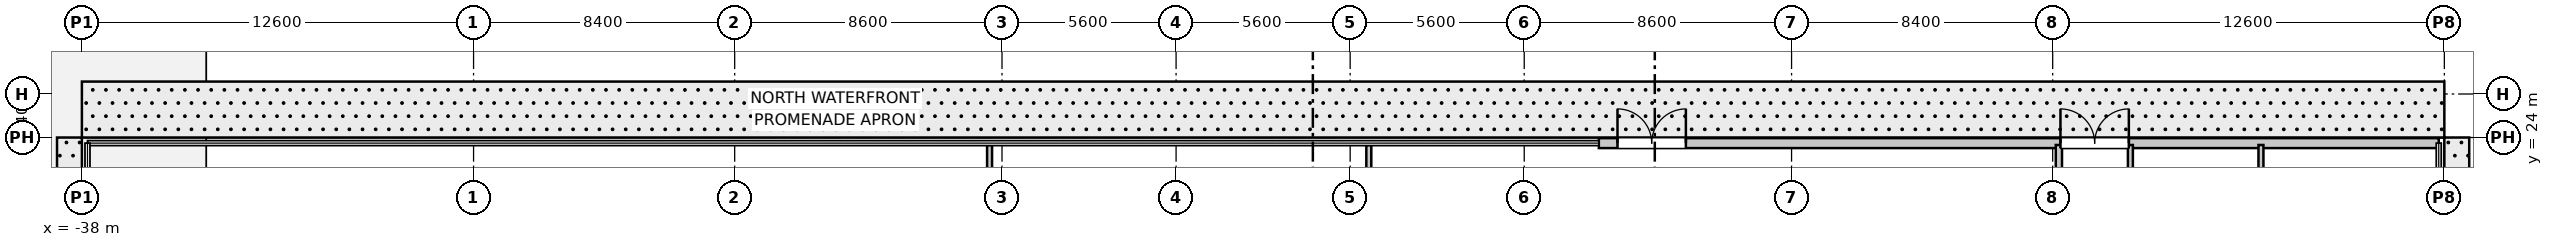
"""IFC4 building model, lengths in metres.
Left out: names, types, materials, properties, quantities, classifications, styles, units other than length and angle.
Written with IfcOpenShell. Run it as: python <this file> out.ifc"""

import sys

from ifc_helpers import new_model, si_unit, direction, frame, frame_2d, origin, place, context, subcontext, project, spatial, rectangle, extrude, source, transform, mapped, element, fill, save


model = new_model("IFC4")
c1 = context("Model", 3, precision=1e-05, world=origin(), true_north=direction((0.0, 1.0)))
c2 = subcontext(c1, "Body", "Model", "MODEL_VIEW")
j1 = project(units=[si_unit("LENGTHUNIT", "METRE"), si_unit("PLANEANGLEUNIT", "RADIAN")], contexts=[c1])
p1 = place(None, origin())
s1 = spatial("IfcSite", under=j1, at=p1, CompositionType="ELEMENT")
p2 = place(p1, origin())
s2 = spatial("IfcBuilding", under=s1, at=p2, CompositionType="ELEMENT")
p3 = place(p2, origin())
s3 = spatial("IfcBuildingStorey", under=s2, at=p3, CompositionType="ELEMENT", Elevation=0.0)
m1 = source(origin(), c2, "Body", "SweptSolid", [
    extrude(rectangle(XDim=27.02, YDim=0.32, at=frame_2d((13.51, 0.0))), origin(), (0.0, 0.0, 1.0), 5.08),
])
p4 = place(p3, frame((10.8, 23.82, 0.0), z_axis=(0.0, 0.0, 1.0), x_axis=(1.0, 0.0, 0.0)))
e1 = element("IfcWall", 1, at=p4, inside=s3, PredefinedType="STANDARD", context=c2, shape_type="MappedRepresentation", body=[
    mapped(m1, transform((0.0, 0.0, 0.0), scale=1.0)),
])
p5 = place(p4, frame((0.6, 0.0, 0.0)))
e2 = element("IfcOpeningElement", 2, at=p5, cuts=e1, PredefinedType="OPENING", context=c2, shape_type="SweptSolid", body=[
    extrude(rectangle(XDim=2.2, YDim=2.6, at=frame_2d((1.1, 1.3))), frame((0.0, 0.17, 0.0), z_axis=(0.0, -1.0, 0.0), x_axis=(1.0, 0.0, 0.0)), (0.0, 0.0, 1.0), 0.34),
])
p6 = place(p4, frame((14.85, 0.0, 0.0)))
e3 = element("IfcOpeningElement", 3, at=p6, cuts=e1, PredefinedType="OPENING", context=c2, shape_type="SweptSolid", body=[
    extrude(rectangle(XDim=2.2, YDim=2.6, at=frame_2d((1.1, 1.3))), frame((0.0, 0.17, 0.0), z_axis=(0.0, -1.0, 0.0), x_axis=(1.0, 0.0, 0.0)), (0.0, 0.0, 1.0), 0.34),
])
m2 = source(origin(), c2, "Body", "SweptSolid", [
    extrude(rectangle(XDim=19.21, YDim=0.2, at=frame_2d((9.605, 0.0))), origin(), (0.0, 0.0, 1.0), 3.4),
])
p7 = place(p3, frame((25.6, 4.55, 0.0), z_axis=(0.0, 0.0, 1.0), x_axis=(0.0, 1.0, 0.0)))
e4 = element("IfcWall", 4, at=p7, inside=s3, PredefinedType="PARTITIONING", context=c2, shape_type="MappedRepresentation", body=[
    mapped(m2, transform((0.0, 0.0, 0.0), scale=1.0)),
])
m3 = source(origin(), c2, "Body", "SweptSolid", [
    extrude(rectangle(XDim=19.21, YDim=0.16, at=frame_2d((9.605, 0.0))), origin(), (0.0, 0.0, 1.0), 3.4),
])
for number, where, z_axis, x_axis in (
    (5, (-8.8, 4.55, 0.0), (0.0, 0.0, 1.0), (0.0, 1.0, 0.0)),
    (6, (3.4, 4.55, 0.0), (0.0, 0.0, 1.0), (0.0, 1.0, 0.0)),
):
    element("IfcWall", number, at=place(p3, frame(where, z_axis=z_axis, x_axis=x_axis)), inside=s3, PredefinedType="PARTITIONING", context=c2, shape_type="MappedRepresentation", body=[
        mapped(m3, transform((0.0, 0.0, 0.0), scale=1.0)),
    ])
p8 = place(p3, frame((27.9, 4.55, 0.0), z_axis=(0.0, 0.0, 1.0), x_axis=(0.0, 1.0, 0.0)))
e7 = element("IfcWall", 7, at=p8, inside=s3, PredefinedType="PARTITIONING", context=c2, shape_type="MappedRepresentation", body=[
    mapped(m3, transform((0.0, 0.0, 0.0), scale=1.0)),
])
p9 = place(p8, frame((5.531, 0.0, 0.0)))
e8 = element("IfcOpeningElement", 8, at=p9, cuts=e7, PredefinedType="OPENING", context=c2, shape_type="SweptSolid", body=[
    extrude(rectangle(XDim=1.5, YDim=2.15, at=frame_2d((0.75, 1.075))), frame((0.0, 0.09, 0.0), z_axis=(0.0, -1.0, 0.0), x_axis=(1.0, 0.0, 0.0)), (0.0, 0.0, 1.0), 0.18),
])
p10 = place(p3, frame((32.1, 4.55, 0.0), z_axis=(0.0, 0.0, 1.0), x_axis=(0.0, 1.0, 0.0)))
e9 = element("IfcWall", 9, at=p10, inside=s3, PredefinedType="PARTITIONING", context=c2, shape_type="MappedRepresentation", body=[
    mapped(m3, transform((0.0, 0.0, 0.0), scale=1.0)),
])
m4 = source(origin(), c2, "Body", "SweptSolid", [
    extrude(rectangle(XDim=2.2, YDim=2.6, at=frame_2d((1.1, 1.3))), frame((0.0, 0.025, 0.0), z_axis=(0.0, -1.0, 0.0), x_axis=(1.0, 0.0, 0.0)), (0.0, 0.0, 1.0), 0.05),
])
p11 = place(p5, origin())
e10 = element("IfcDoor", 10, at=p11, inside=s3, OperationType="DOUBLE_DOOR_SINGLE_SWING", PredefinedType="DOOR", context=c2, shape_type="MappedRepresentation", body=[
    mapped(m4, transform((0.0, 0.0, 0.0), scale=1.0)),
])
fill(e2, e10)
p12 = place(p6, origin())
e11 = element("IfcDoor", 11, at=p12, inside=s3, OperationType="DOUBLE_DOOR_SINGLE_SWING", PredefinedType="DOOR", context=c2, shape_type="MappedRepresentation", body=[
    mapped(m4, transform((0.0, 0.0, 0.0), scale=1.0)),
])
fill(e3, e11)
save(model, sys.argv[1])
